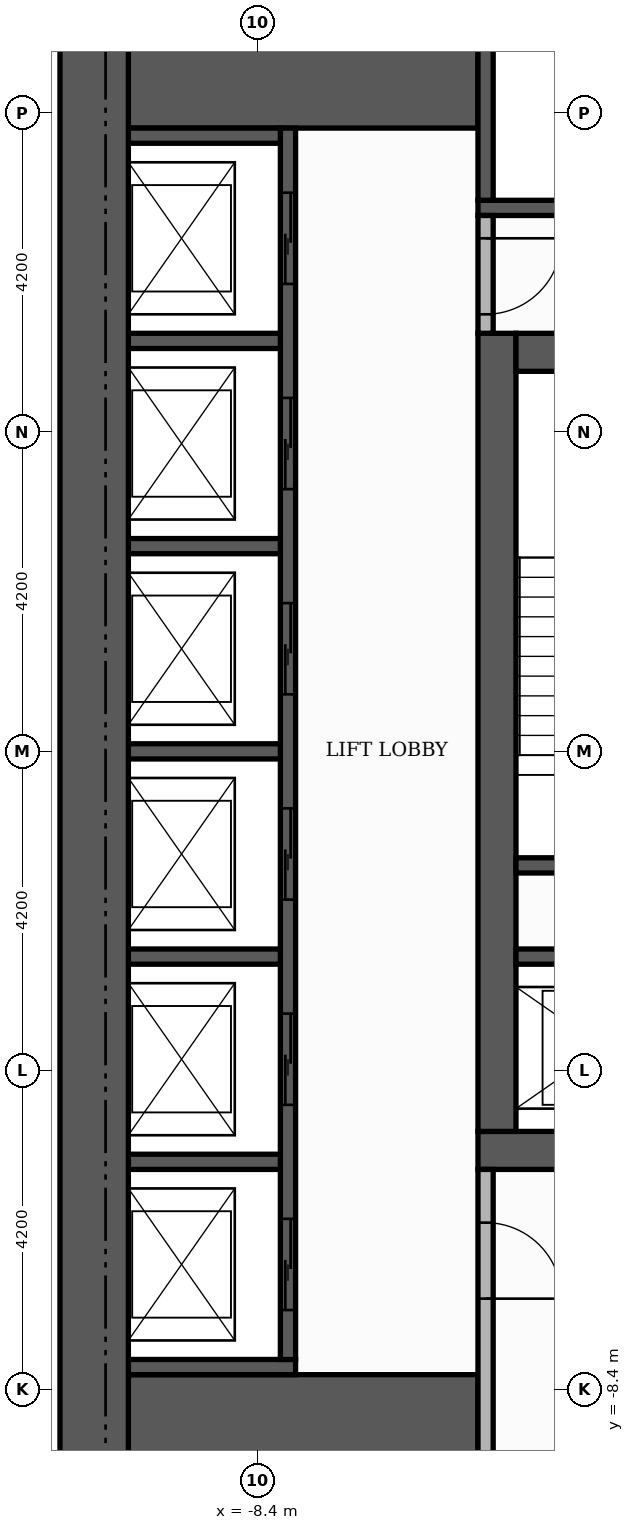
"""IFC4 building model, lengths in metres.
Left out: names, types, materials, properties, quantities, classifications, styles, units other than length and angle.
Written with IfcOpenShell. Run it as: python <this file> out.ifc"""

import sys

from ifc_helpers import new_model, si_unit, direction, frame, frame_2d, origin, place, context, subcontext, project, spatial, rectangle, extrude, element, fill, save


model = new_model("IFC4")
c1 = context("Model", 3, precision=1e-05, world=origin(), true_north=direction((0.0, 1.0)))
c2 = subcontext(c1, "Body", "Model", "MODEL_VIEW")
j1 = project(units=[si_unit("LENGTHUNIT", "METRE"), si_unit("PLANEANGLEUNIT", "RADIAN")], contexts=[c1])
p1 = place(None, origin())
s1 = spatial("IfcSite", under=j1, at=p1, CompositionType="ELEMENT")
p2 = place(p1, origin())
s2 = spatial("IfcBuilding", under=s1, at=p2, CompositionType="ELEMENT")
p3 = place(p2, frame((0.0, 0.0, 94.8)))
s3 = spatial("IfcBuildingStorey", under=s2, at=p3, CompositionType="ELEMENT", Elevation=94.8)
p4 = place(p3, frame((-5.5, -5.25, 0.0), z_axis=(0.0, 0.0, 1.0), x_axis=(1.0, 0.0, 0.0)))
e1 = element("IfcWall", 1, at=p4, inside=s3, PredefinedType="SHEAR", context=c2, shape_type="SweptSolid", body=[
    extrude(rectangle(XDim=11.0, YDim=0.5, at=frame_2d((5.5, 0.0))), origin(), (0.0, 0.0, 1.0), 3.48),
])
p5 = place(p4, frame((4.9, 0.0, 0.0)))
e2 = element("IfcOpeningElement", 2, at=p5, cuts=e1, PredefinedType="OPENING", context=c2, shape_type="SweptSolid", body=[
    extrude(rectangle(XDim=1.2, YDim=2.1, at=frame_2d((0.6, 1.05))), frame((0.0, 0.26, 0.0), z_axis=(0.0, -1.0, 0.0), x_axis=(1.0, 0.0, 0.0)), (0.0, 0.0, 1.0), 0.52),
])
p6 = place(p3, frame((-5.25, -5.0, 0.0), z_axis=(0.0, 0.0, 1.0), x_axis=(0.0, 1.0, 0.0)))
e3 = element("IfcWall", 3, at=p6, inside=s3, PredefinedType="SHEAR", context=c2, shape_type="SweptSolid", body=[
    extrude(rectangle(XDim=10.5, YDim=0.5, at=frame_2d((5.25, 0.0))), origin(), (0.0, 0.0, 1.0), 3.48),
])
p7 = place(p3, frame((-5.0, 5.25, 0.0), z_axis=(0.0, 0.0, 1.0), x_axis=(1.0, 0.0, 0.0)))
e4 = element("IfcWall", 4, at=p7, inside=s3, PredefinedType="SHEAR", context=c2, shape_type="SweptSolid", body=[
    extrude(rectangle(XDim=10.0, YDim=0.5, at=frame_2d((5.0, 0.0))), origin(), (0.0, 0.0, 1.0), 3.48),
])
p8 = place(p7, frame((4.4, 0.0, 0.0)))
e5 = element("IfcOpeningElement", 5, at=p8, cuts=e4, PredefinedType="OPENING", context=c2, shape_type="SweptSolid", body=[
    extrude(rectangle(XDim=1.2, YDim=2.1, at=frame_2d((0.6, 1.05))), frame((0.0, 0.26, 0.0), z_axis=(0.0, -1.0, 0.0), x_axis=(1.0, 0.0, 0.0)), (0.0, 0.0, 1.0), 0.52),
])
for number, where, z_axis, x_axis in (
    (6, (-10.1, -9.15, 0.0), (0.0, 0.0, 1.0), (1.0, 0.0, 0.0)),
    (7, (-10.1, 9.15, 0.0), (0.0, 0.0, 1.0), (1.0, 0.0, 0.0)),
):
    element("IfcWall", number, at=place(p3, frame(where, z_axis=z_axis, x_axis=x_axis)), inside=s3, PredefinedType="SHEAR", context=c2, shape_type="SweptSolid", body=[
        extrude(rectangle(XDim=4.6, YDim=1.9, at=frame_2d((2.3, 0.0))), origin(), (0.0, 0.0, 1.0), 3.48),
    ])
p9 = place(p3, frame((-5.0, -1.5, 0.0), z_axis=(0.0, 0.0, 1.0), x_axis=(1.0, 0.0, 0.0)))
e8 = element("IfcWall", 8, at=p9, inside=s3, PredefinedType="SHEAR", context=c2, shape_type="SweptSolid", body=[
    extrude(rectangle(XDim=3.05, YDim=0.2, at=frame_2d((1.525, 0.0))), origin(), (0.0, 0.0, 1.0), 3.48),
])
p10 = place(p3, frame((-5.5, 7.15, 0.0), z_axis=(0.0, 0.0, 1.0), x_axis=(1.0, 0.0, 0.0)))
e9 = element("IfcWall", 9, at=p10, inside=s3, PredefinedType="SHEAR", context=c2, shape_type="SweptSolid", body=[
    extrude(rectangle(XDim=6.8, YDim=0.2, at=frame_2d((3.4, 0.0))), origin(), (0.0, 0.0, 1.0), 3.48),
])
p11 = place(p3, frame((-5.4, 7.25, 0.0), z_axis=(0.0, 0.0, 1.0), x_axis=(0.0, 1.0, 0.0)))
e10 = element("IfcWall", 10, at=p11, inside=s3, PredefinedType="SHEAR", context=c2, shape_type="SweptSolid", body=[
    extrude(rectangle(XDim=2.85, YDim=0.2, at=frame_2d((1.425, 0.0))), origin(), (0.0, 0.0, 1.0), 3.48),
])
p12 = place(p3, frame((-10.1, -8.1, 0.0), z_axis=(0.0, 0.0, 1.0), x_axis=(1.0, 0.0, 0.0)))
e11 = element("IfcWall", 11, at=p12, inside=s3, PredefinedType="SHEAR", context=c2, shape_type="SweptSolid", body=[
    extrude(rectangle(XDim=2.2, YDim=0.2, at=frame_2d((1.1, 0.0))), origin(), (0.0, 0.0, 1.0), 3.48),
])
p13 = place(p3, frame((-8.0, -8.0, 0.0), z_axis=(0.0, 0.0, 1.0), x_axis=(0.0, 1.0, 0.0)))
e12 = element("IfcWall", 12, at=p13, inside=s3, PredefinedType="SHEAR", context=c2, shape_type="SweptSolid", body=[
    extrude(rectangle(XDim=16.2, YDim=0.2, at=frame_2d((8.1, 0.0))), origin(), (0.0, 0.0, 1.0), 3.48),
])
p14 = place(p13, frame((0.65, 0.0, 0.0)))
e13 = element("IfcOpeningElement", 13, at=p14, cuts=e12, PredefinedType="OPENING", context=c2, shape_type="SweptSolid", body=[
    extrude(rectangle(XDim=1.2, YDim=2.1, at=frame_2d((0.6, 1.05))), frame((0.0, 0.11, 0.0), z_axis=(0.0, -1.0, 0.0), x_axis=(1.0, 0.0, 0.0)), (0.0, 0.0, 1.0), 0.22),
])
p15 = place(p13, frame((3.35, 0.0, 0.0)))
e14 = element("IfcOpeningElement", 14, at=p15, cuts=e12, PredefinedType="OPENING", context=c2, shape_type="SweptSolid", body=[
    extrude(rectangle(XDim=1.2, YDim=2.1, at=frame_2d((0.6, 1.05))), frame((0.0, 0.11, 0.0), z_axis=(0.0, -1.0, 0.0), x_axis=(1.0, 0.0, 0.0)), (0.0, 0.0, 1.0), 0.22),
])
p16 = place(p13, frame((6.05, 0.0, 0.0)))
e15 = element("IfcOpeningElement", 15, at=p16, cuts=e12, PredefinedType="OPENING", context=c2, shape_type="SweptSolid", body=[
    extrude(rectangle(XDim=1.2, YDim=2.1, at=frame_2d((0.6, 1.05))), frame((0.0, 0.11, 0.0), z_axis=(0.0, -1.0, 0.0), x_axis=(1.0, 0.0, 0.0)), (0.0, 0.0, 1.0), 0.22),
])
p17 = place(p13, frame((8.75, 0.0, 0.0)))
e16 = element("IfcOpeningElement", 16, at=p17, cuts=e12, PredefinedType="OPENING", context=c2, shape_type="SweptSolid", body=[
    extrude(rectangle(XDim=1.2, YDim=2.1, at=frame_2d((0.6, 1.05))), frame((0.0, 0.11, 0.0), z_axis=(0.0, -1.0, 0.0), x_axis=(1.0, 0.0, 0.0)), (0.0, 0.0, 1.0), 0.22),
])
p18 = place(p13, frame((11.45, 0.0, 0.0)))
e17 = element("IfcOpeningElement", 17, at=p18, cuts=e12, PredefinedType="OPENING", context=c2, shape_type="SweptSolid", body=[
    extrude(rectangle(XDim=1.2, YDim=2.1, at=frame_2d((0.6, 1.05))), frame((0.0, 0.11, 0.0), z_axis=(0.0, -1.0, 0.0), x_axis=(1.0, 0.0, 0.0)), (0.0, 0.0, 1.0), 0.22),
])
p19 = place(p13, frame((14.15, 0.0, 0.0)))
e18 = element("IfcOpeningElement", 18, at=p19, cuts=e12, PredefinedType="OPENING", context=c2, shape_type="SweptSolid", body=[
    extrude(rectangle(XDim=1.2, YDim=2.1, at=frame_2d((0.6, 1.05))), frame((0.0, 0.11, 0.0), z_axis=(0.0, -1.0, 0.0), x_axis=(1.0, 0.0, 0.0)), (0.0, 0.0, 1.0), 0.22),
])
for number, where, z_axis, x_axis in (
    (19, (-10.1, -5.4, 0.0), (0.0, 0.0, 1.0), (1.0, 0.0, 0.0)),
    (20, (-10.1, -2.7, 0.0), (0.0, 0.0, 1.0), (1.0, 0.0, 0.0)),
):
    element("IfcWall", number, at=place(p3, frame(where, z_axis=z_axis, x_axis=x_axis)), inside=s3, PredefinedType="SHEAR", context=c2, shape_type="SweptSolid", body=[
        extrude(rectangle(XDim=2.0, YDim=0.2, at=frame_2d((1.0, 0.0))), origin(), (0.0, 0.0, 1.0), 3.48),
    ])
p20 = place(p3, frame((-5.0, -2.7, 0.0), z_axis=(0.0, 0.0, 1.0), x_axis=(1.0, 0.0, 0.0)))
e21 = element("IfcWall", 21, at=p20, inside=s3, PredefinedType="SHEAR", context=c2, shape_type="SweptSolid", body=[
    extrude(rectangle(XDim=2.85, YDim=0.2, at=frame_2d((1.425, 0.0))), origin(), (0.0, 0.0, 1.0), 3.48),
])
for number, where, z_axis, x_axis in (
    (22, (-10.1, 0.0, 0.0), (0.0, 0.0, 1.0), (1.0, 0.0, 0.0)),
    (23, (-10.1, 2.7, 0.0), (0.0, 0.0, 1.0), (1.0, 0.0, 0.0)),
    (24, (-10.1, 5.4, 0.0), (0.0, 0.0, 1.0), (1.0, 0.0, 0.0)),
    (25, (-10.1, 8.1, 0.0), (0.0, 0.0, 1.0), (1.0, 0.0, 0.0)),
):
    element("IfcWall", number, at=place(p3, frame(where, z_axis=z_axis, x_axis=x_axis)), inside=s3, PredefinedType="SHEAR", context=c2, shape_type="SweptSolid", body=[
        extrude(rectangle(XDim=2.0, YDim=0.2, at=frame_2d((1.0, 0.0))), origin(), (0.0, 0.0, 1.0), 3.48),
    ])
p21 = place(p3, frame((-10.55, -10.1, 0.0), z_axis=(0.0, 0.0, 1.0), x_axis=(0.0, 1.0, 0.0)))
e26 = element("IfcWall", 26, at=p21, inside=s3, PredefinedType="SHEAR", context=c2, shape_type="SweptSolid", body=[
    extrude(rectangle(XDim=20.2, YDim=0.9, at=frame_2d((10.1, 0.0))), origin(), (0.0, 0.0, 1.0), 3.48),
])
p22 = place(p3, frame((-5.4, -10.1, 0.0), z_axis=(0.0, 0.0, 1.0), x_axis=(0.0, 1.0, 0.0)))
e27 = element("IfcWall", 27, at=p22, inside=s3, PredefinedType="PARTITIONING", context=c2, shape_type="SweptSolid", body=[
    extrude(rectangle(XDim=4.6, YDim=0.2, at=frame_2d((2.3, 0.0))), origin(), (0.0, 0.0, 1.0), 3.48),
])
p23 = place(p22, frame((2.9, 0.0, 0.0)))
e28 = element("IfcOpeningElement", 28, at=p23, cuts=e27, PredefinedType="OPENING", context=c2, shape_type="SweptSolid", body=[
    extrude(rectangle(XDim=1.0, YDim=2.1, at=frame_2d((0.5, 1.05))), frame((0.0, 0.11, 0.0), z_axis=(0.0, -1.0, 0.0), x_axis=(1.0, 0.0, 0.0)), (0.0, 0.0, 1.0), 0.22),
])
p24 = place(p3, frame((-5.4, 5.5, 0.0), z_axis=(0.0, 0.0, 1.0), x_axis=(0.0, 1.0, 0.0)))
e29 = element("IfcWall", 29, at=p24, inside=s3, PredefinedType="PARTITIONING", context=c2, shape_type="SweptSolid", body=[
    extrude(rectangle(XDim=1.55, YDim=0.2, at=frame_2d((0.775, 0.0))), origin(), (0.0, 0.0, 1.0), 3.48),
])
p25 = place(p24, frame((0.25, 0.0, 0.0)))
e30 = element("IfcOpeningElement", 30, at=p25, cuts=e29, PredefinedType="OPENING", context=c2, shape_type="SweptSolid", body=[
    extrude(rectangle(XDim=1.0, YDim=2.1, at=frame_2d((0.5, 1.05))), frame((0.0, 0.11, 0.0), z_axis=(0.0, -1.0, 0.0), x_axis=(1.0, 0.0, 0.0)), (0.0, 0.0, 1.0), 0.22),
])
p26 = place(p14, origin())
e31 = element("IfcDoor", 31, at=p26, inside=s3, OperationType="SLIDING_TO_LEFT", PredefinedType="DOOR", context=c2, shape_type="SweptSolid", body=[
    extrude(rectangle(XDim=1.2, YDim=2.1, at=frame_2d((0.6, 1.05))), frame((0.0, 0.025, 0.0), z_axis=(0.0, -1.0, 0.0), x_axis=(1.0, 0.0, 0.0)), (0.0, 0.0, 1.0), 0.05),
])
fill(e13, e31)
p27 = place(p15, origin())
e32 = element("IfcDoor", 32, at=p27, inside=s3, OperationType="SLIDING_TO_LEFT", PredefinedType="DOOR", context=c2, shape_type="SweptSolid", body=[
    extrude(rectangle(XDim=1.2, YDim=2.1, at=frame_2d((0.6, 1.05))), frame((0.0, 0.025, 0.0), z_axis=(0.0, -1.0, 0.0), x_axis=(1.0, 0.0, 0.0)), (0.0, 0.0, 1.0), 0.05),
])
fill(e14, e32)
p28 = place(p16, origin())
e33 = element("IfcDoor", 33, at=p28, inside=s3, OperationType="SLIDING_TO_LEFT", PredefinedType="DOOR", context=c2, shape_type="SweptSolid", body=[
    extrude(rectangle(XDim=1.2, YDim=2.1, at=frame_2d((0.6, 1.05))), frame((0.0, 0.025, 0.0), z_axis=(0.0, -1.0, 0.0), x_axis=(1.0, 0.0, 0.0)), (0.0, 0.0, 1.0), 0.05),
])
fill(e15, e33)
p29 = place(p17, origin())
e34 = element("IfcDoor", 34, at=p29, inside=s3, OperationType="SLIDING_TO_LEFT", PredefinedType="DOOR", context=c2, shape_type="SweptSolid", body=[
    extrude(rectangle(XDim=1.2, YDim=2.1, at=frame_2d((0.6, 1.05))), frame((0.0, 0.025, 0.0), z_axis=(0.0, -1.0, 0.0), x_axis=(1.0, 0.0, 0.0)), (0.0, 0.0, 1.0), 0.05),
])
fill(e16, e34)
p30 = place(p18, origin())
e35 = element("IfcDoor", 35, at=p30, inside=s3, OperationType="SLIDING_TO_LEFT", PredefinedType="DOOR", context=c2, shape_type="SweptSolid", body=[
    extrude(rectangle(XDim=1.2, YDim=2.1, at=frame_2d((0.6, 1.05))), frame((0.0, 0.025, 0.0), z_axis=(0.0, -1.0, 0.0), x_axis=(1.0, 0.0, 0.0)), (0.0, 0.0, 1.0), 0.05),
])
fill(e17, e35)
p31 = place(p19, origin())
e36 = element("IfcDoor", 36, at=p31, inside=s3, OperationType="SLIDING_TO_LEFT", PredefinedType="DOOR", context=c2, shape_type="SweptSolid", body=[
    extrude(rectangle(XDim=1.2, YDim=2.1, at=frame_2d((0.6, 1.05))), frame((0.0, 0.025, 0.0), z_axis=(0.0, -1.0, 0.0), x_axis=(1.0, 0.0, 0.0)), (0.0, 0.0, 1.0), 0.05),
])
fill(e18, e36)
p32 = place(p25, frame((1.0, 0.0, 0.0), z_axis=(0.0, 0.0, 1.0), x_axis=(-1.0, 0.0, 0.0)))
e37 = element("IfcDoor", 37, at=p32, inside=s3, OperationType="SINGLE_SWING_RIGHT", PredefinedType="DOOR", context=c2, shape_type="SweptSolid", body=[
    extrude(rectangle(XDim=1.0, YDim=2.1, at=frame_2d((0.5, 1.05))), frame((0.0, 0.025, 0.0), z_axis=(0.0, -1.0, 0.0), x_axis=(1.0, 0.0, 0.0)), (0.0, 0.0, 1.0), 0.05),
])
fill(e30, e37)
p33 = place(p23, frame((1.0, 0.0, 0.0), z_axis=(0.0, 0.0, 1.0), x_axis=(-1.0, 0.0, 0.0)))
e38 = element("IfcDoor", 38, at=p33, inside=s3, OperationType="SINGLE_SWING_LEFT", PredefinedType="DOOR", context=c2, shape_type="SweptSolid", body=[
    extrude(rectangle(XDim=1.0, YDim=2.1, at=frame_2d((0.5, 1.05))), frame((0.0, 0.025, 0.0), z_axis=(0.0, -1.0, 0.0), x_axis=(1.0, 0.0, 0.0)), (0.0, 0.0, 1.0), 0.05),
])
fill(e28, e38)
save(model, sys.argv[1])
